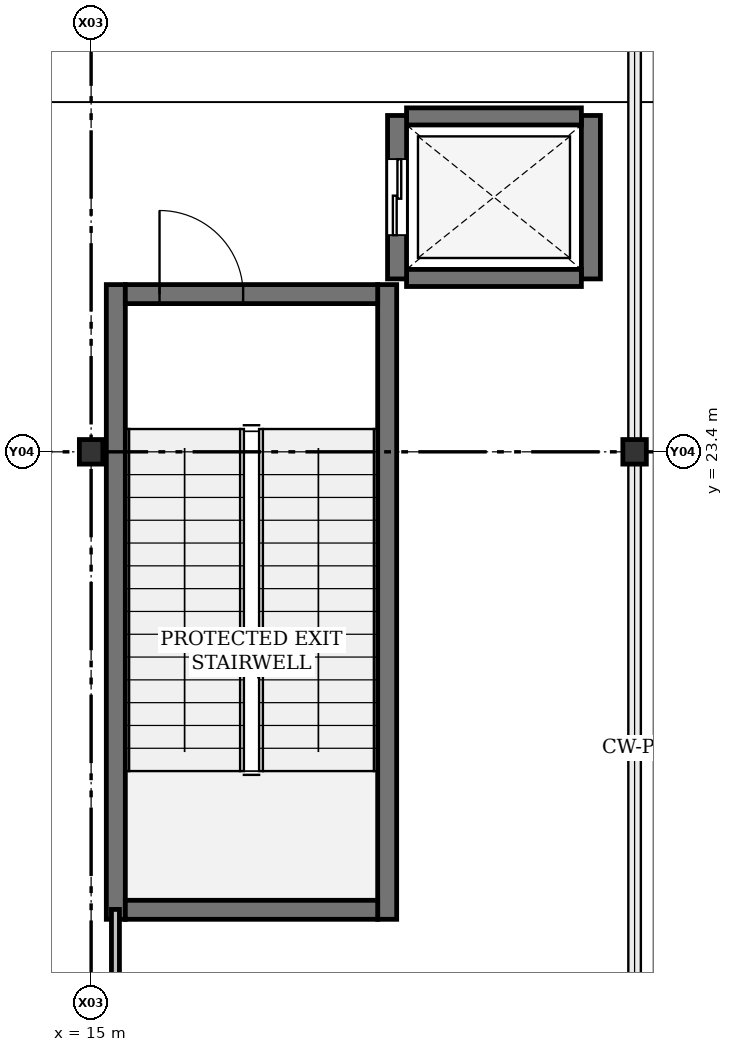
"""IFC4 building model, lengths in metres.
Left out: names, types, materials, properties, quantities, classifications, styles, units other than length and angle.
Written with IfcOpenShell. Run it as: python <this file> out.ifc"""

import sys

from ifc_helpers import new_model, si_unit, direction, frame, frame_2d, origin, origin_2d, place, context, subcontext, project, spatial, rectangle, i_section, extrude, element, fill, save


model = new_model("IFC4")
c1 = context("Model", 3, precision=1e-05, world=origin(), true_north=direction((0.0, 1.0)))
c2 = subcontext(c1, "Body", "Model", "MODEL_VIEW")
j1 = project(units=[si_unit("LENGTHUNIT", "METRE"), si_unit("PLANEANGLEUNIT", "RADIAN")], contexts=[c1])
p1 = place(None, origin())
s1 = spatial("IfcSite", under=j1, at=p1, CompositionType="ELEMENT")
p2 = place(p1, origin())
s2 = spatial("IfcBuilding", under=s1, at=p2, CompositionType="ELEMENT")
p3 = place(p2, origin())
s3 = spatial("IfcBuildingStorey", under=s2, at=p3, CompositionType="ELEMENT", Elevation=0.0)
for number, where, z_axis, x_axis in (
    (1, (15.0, 23.4, 0.0), (0.0, 0.0, 1.0), (1.0, 0.0, 0.0)),
    (2, (22.15, 23.4, 0.0), (0.0, 0.0, 1.0), (1.0, 0.0, 0.0)),
):
    element("IfcColumn", number, at=place(p3, frame(where, z_axis=z_axis, x_axis=x_axis)), inside=s3, PredefinedType="COLUMN", context=c2, shape_type="SweptSolid", body=[
        extrude(i_section(OverallWidth=0.309, OverallDepth=0.323, WebThickness=0.014, FlangeThickness=0.023, FilletRadius=0.015, at=origin_2d()), origin(), (0.0, 0.0, 1.0), 5.4),
    ])
for number, where, z_axis, x_axis in (
    (3, (15.325, 17.25, 0.0), (0.0, 0.0, 1.0), (0.0, 1.0, 0.0)),
    (4, (18.895, 17.25, 0.0), (0.0, 0.0, 1.0), (0.0, 1.0, 0.0)),
):
    element("IfcWall", number, at=place(p3, frame(where, z_axis=z_axis, x_axis=x_axis)), inside=s3, PredefinedType="SHEAR", context=c2, shape_type="SweptSolid", body=[
        extrude(rectangle(XDim=8.35, YDim=0.25, at=frame_2d((4.175, 0.0))), origin(), (0.0, 0.0, 1.0), 5.4),
    ])
p4 = place(p3, frame((15.45, 17.375, 0.0), z_axis=(0.0, 0.0, 1.0), x_axis=(1.0, 0.0, 0.0)))
e5 = element("IfcWall", 5, at=p4, inside=s3, PredefinedType="SHEAR", context=c2, shape_type="SweptSolid", body=[
    extrude(rectangle(XDim=3.32, YDim=0.25, at=frame_2d((1.66, 0.0))), origin(), (0.0, 0.0, 1.0), 5.4),
])
p5 = place(p3, frame((15.45, 25.475, 0.0), z_axis=(0.0, 0.0, 1.0), x_axis=(1.0, 0.0, 0.0)))
e6 = element("IfcWall", 6, at=p5, inside=s3, PredefinedType="SHEAR", context=c2, shape_type="SweptSolid", body=[
    extrude(rectangle(XDim=3.32, YDim=0.25, at=frame_2d((1.66, 0.0))), origin(), (0.0, 0.0, 1.0), 5.4),
])
p6 = place(p5, frame((0.45, 0.0, 0.0)))
e7 = element("IfcOpeningElement", 7, at=p6, cuts=e6, PredefinedType="OPENING", context=c2, shape_type="SweptSolid", body=[
    extrude(rectangle(XDim=1.1, YDim=2.15, at=frame_2d((0.55, 1.075))), frame((0.0, 0.125, 0.0), z_axis=(0.0, -1.0, 0.0), x_axis=(1.0, 0.0, 0.0)), (0.0, 0.0, 1.0), 0.25),
])
p7 = place(p3, frame((21.575, 25.675, 0.0), z_axis=(0.0, 0.0, 1.0), x_axis=(0.0, 1.0, 0.0)))
e8 = element("IfcWall", 8, at=p7, inside=s3, PredefinedType="SHEAR", context=c2, shape_type="SweptSolid", body=[
    extrude(rectangle(XDim=2.15, YDim=0.25, at=frame_2d((1.075, 0.0))), origin(), (0.0, 0.0, 1.0), 5.4),
])
for number, where, z_axis, x_axis in (
    (9, (19.15, 25.688, 0.0), (0.0, 0.0, 1.0), (1.0, 0.0, 0.0)),
    (10, (19.15, 27.812, 0.0), (0.0, 0.0, 1.0), (1.0, 0.0, 0.0)),
):
    element("IfcWall", number, at=place(p3, frame(where, z_axis=z_axis, x_axis=x_axis)), inside=s3, PredefinedType="SHEAR", context=c2, shape_type="SweptSolid", body=[
        extrude(rectangle(XDim=2.3, YDim=0.225, at=frame_2d((1.15, 0.0))), origin(), (0.0, 0.0, 1.0), 5.4),
    ])
p8 = place(p3, frame((19.025, 25.675, 0.0), z_axis=(0.0, 0.0, 1.0), x_axis=(0.0, 1.0, 0.0)))
e11 = element("IfcWall", 11, at=p8, inside=s3, PredefinedType="SHEAR", context=c2, shape_type="SweptSolid", body=[
    extrude(rectangle(XDim=2.15, YDim=0.25, at=frame_2d((1.075, 0.0))), origin(), (0.0, 0.0, 1.0), 5.4),
])
p9 = place(p8, frame((0.575, 0.0, 0.0)))
e12 = element("IfcOpeningElement", 12, at=p9, cuts=e11, PredefinedType="OPENING", context=c2, shape_type="SweptSolid", body=[
    extrude(rectangle(XDim=1.0, YDim=2.1, at=frame_2d((0.5, 1.05))), frame((0.0, 0.125, 0.0), z_axis=(0.0, -1.0, 0.0), x_axis=(1.0, 0.0, 0.0)), (0.0, 0.0, 1.0), 0.25),
])
p10 = place(p3, frame((15.32, 15.6, 0.0), z_axis=(0.0, 0.0, 1.0), x_axis=(0.0, 1.0, 0.0)))
e13 = element("IfcWall", 13, at=p10, inside=s3, PredefinedType="PARTITIONING", context=c2, shape_type="SweptSolid", body=[
    extrude(rectangle(XDim=1.78, YDim=0.105, at=frame_2d((0.89, 0.0))), origin(), (0.0, 0.0, 1.0), 4.661),
])
p11 = place(p6, origin())
e14 = element("IfcDoor", 14, at=p11, inside=s3, OperationType="SINGLE_SWING_LEFT", PredefinedType="DOOR", context=c2, shape_type="SweptSolid", body=[
    extrude(rectangle(XDim=1.1, YDim=2.15, at=frame_2d((0.55, 1.075))), frame((0.0, 0.025, 0.0), z_axis=(0.0, -1.0, 0.0), x_axis=(1.0, 0.0, 0.0)), (0.0, 0.0, 1.0), 0.05),
])
fill(e7, e14)
p12 = place(p9, origin())
e15 = element("IfcDoor", 15, at=p12, inside=s3, OperationType="SLIDING_TO_LEFT", PredefinedType="DOOR", context=c2, shape_type="SweptSolid", body=[
    extrude(rectangle(XDim=1.0, YDim=2.1, at=frame_2d((0.5, 1.05))), frame((0.0, 0.025, 0.0), z_axis=(0.0, -1.0, 0.0), x_axis=(1.0, 0.0, 0.0)), (0.0, 0.0, 1.0), 0.05),
])
fill(e12, e15)
save(model, sys.argv[1])
